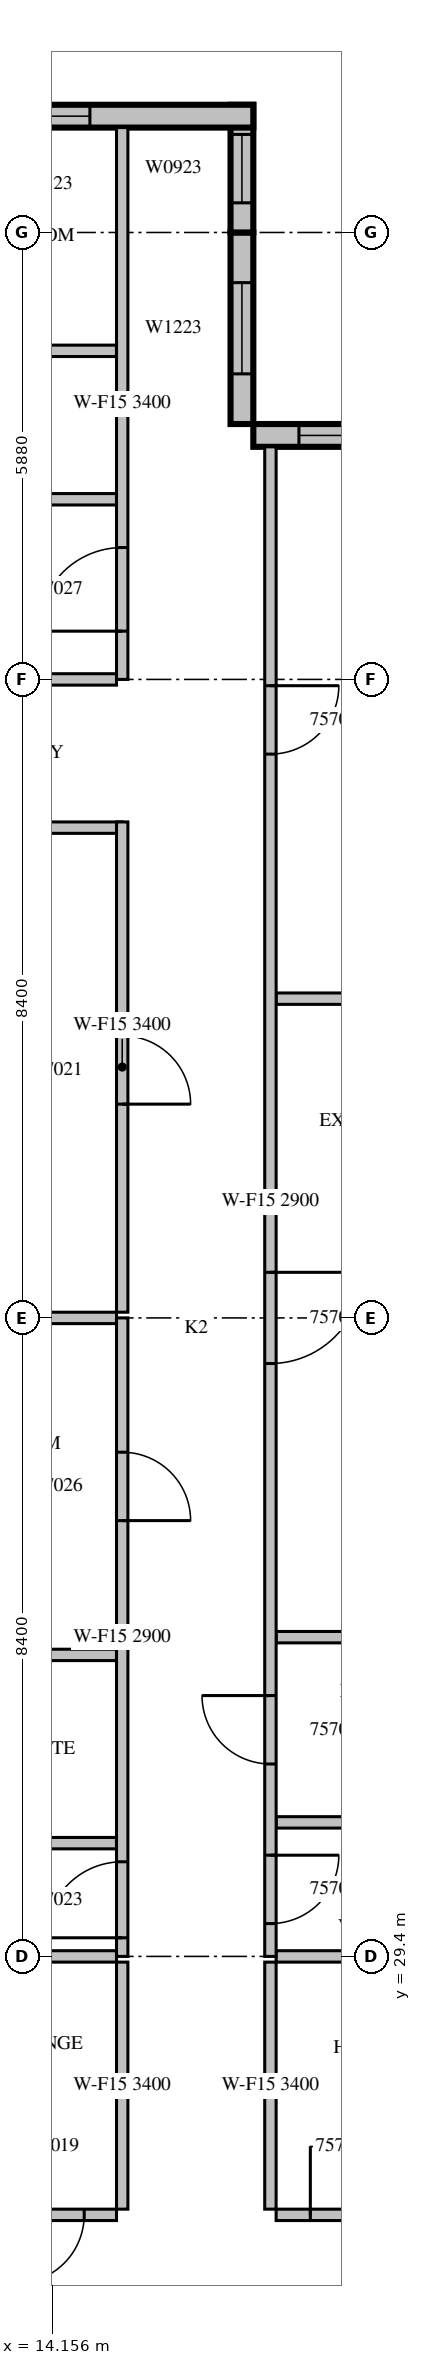
"""IFC4 building model, lengths in metres.
Left out: names, types, materials, properties, quantities, classifications, styles, units other than length and angle.
Written with IfcOpenShell. Run it as: python <this file> out.ifc"""

import sys

from ifc_helpers import new_model, si_unit, direction, frame, frame_2d, origin, place, context, subcontext, project, spatial, rectangle, extrude, source, transform, mapped, element, fill, save


model = new_model("IFC4")
c1 = context("Model", 3, precision=1e-05, world=origin(), true_north=direction((0.0, 1.0)))
c2 = subcontext(c1, "Body", "Model", "MODEL_VIEW")
j1 = project(units=[si_unit("LENGTHUNIT", "METRE"), si_unit("PLANEANGLEUNIT", "RADIAN")], contexts=[c1])
p1 = place(None, origin())
s1 = spatial("IfcSite", under=j1, at=p1, CompositionType="ELEMENT")
p2 = place(p1, origin())
s2 = spatial("IfcBuilding", under=s1, at=p2, CompositionType="ELEMENT")
p3 = place(p2, frame((0.0, 0.0, 250.0)))
s3 = spatial("IfcBuildingStorey", under=s2, at=p3, CompositionType="ELEMENT", Elevation=250.0)
m1 = source(origin(), c2, "Body", "SweptSolid", [
    extrude(rectangle(XDim=4.2, YDim=0.3, at=frame_2d((2.1, 0.0))), origin(), (0.0, 0.0, 1.0), 3.4),
])
p4 = place(p3, frame((21.0, 49.41, 0.0), z_axis=(0.0, 0.0, 1.0), x_axis=(-1.0, 0.0, 0.0)))
e1 = element("IfcWall", 1, at=p4, inside=s3, PredefinedType="STANDARD", context=c2, shape_type="MappedRepresentation", body=[
    mapped(m1, transform((0.0, 0.0, 0.0), scale=1.0)),
])
m2 = source(origin(), c2, "Body", "SweptSolid", [
    extrude(rectangle(XDim=3.0, YDim=2.3, at=frame_2d((1.5, 1.15))), frame((0.0, 0.16, 0.0), z_axis=(0.0, -1.0, 0.0), x_axis=(1.0, 0.0, 0.0)), (0.0, 0.0, 1.0), 0.32),
])
p5 = place(p4, frame((0.6, 0.0, 0.6)))
e2 = element("IfcOpeningElement", 2, at=p5, cuts=e1, PredefinedType="OPENING", context=c2, shape_type="MappedRepresentation", body=[
    mapped(m2, transform((0.0, 0.0, 0.0), scale=1.0)),
])
m3 = source(origin(), c2, "Body", "SweptSolid", [
    extrude(rectangle(XDim=2.52, YDim=0.3, at=frame_2d((1.26, 0.0))), origin(), (0.0, 0.0, 1.0), 3.4),
])
p6 = place(p3, frame((16.65, 49.56, 0.0), z_axis=(0.0, 0.0, 1.0), x_axis=(0.0, 1.0, 0.0)))
e3 = element("IfcWall", 3, at=p6, inside=s3, PredefinedType="STANDARD", context=c2, shape_type="MappedRepresentation", body=[
    mapped(m3, transform((0.0, 0.0, 0.0), scale=1.0)),
])
m4 = source(origin(), c2, "Body", "SweptSolid", [
    extrude(rectangle(XDim=1.2, YDim=2.3, at=frame_2d((0.6, 1.15))), frame((0.0, 0.16, 0.0), z_axis=(0.0, -1.0, 0.0), x_axis=(1.0, 0.0, 0.0)), (0.0, 0.0, 1.0), 0.32),
])
p7 = place(p6, frame((0.66, 0.0, 0.6)))
e4 = element("IfcOpeningElement", 4, at=p7, cuts=e3, PredefinedType="OPENING", context=c2, shape_type="MappedRepresentation", body=[
    mapped(m4, transform((0.0, 0.0, 0.0), scale=1.0)),
])
m5 = source(origin(), c2, "Body", "SweptSolid", [
    extrude(rectangle(XDim=1.68, YDim=0.3, at=frame_2d((0.84, 0.0))), origin(), (0.0, 0.0, 1.0), 3.4),
])
p8 = place(p3, frame((16.65, 52.08, 0.0), z_axis=(0.0, 0.0, 1.0), x_axis=(0.0, 1.0, 0.0)))
e5 = element("IfcWall", 5, at=p8, inside=s3, PredefinedType="STANDARD", context=c2, shape_type="MappedRepresentation", body=[
    mapped(m5, transform((0.0, 0.0, 0.0), scale=1.0)),
])
m6 = source(origin(), c2, "Body", "SweptSolid", [
    extrude(rectangle(XDim=0.9, YDim=2.3, at=frame_2d((0.45, 1.15))), frame((0.0, 0.16, 0.0), z_axis=(0.0, -1.0, 0.0), x_axis=(1.0, 0.0, 0.0)), (0.0, 0.0, 1.0), 0.32),
])
p9 = place(p8, frame((0.39, 0.0, 0.6)))
e6 = element("IfcOpeningElement", 6, at=p9, cuts=e5, PredefinedType="OPENING", context=c2, shape_type="MappedRepresentation", body=[
    mapped(m6, transform((0.0, 0.0, 0.0), scale=1.0)),
])
m7 = source(origin(), c2, "Body", "SweptSolid", [
    extrude(rectangle(XDim=10.5, YDim=0.3, at=frame_2d((5.25, 0.0))), origin(), (0.0, 0.0, 1.0), 3.4),
])
p10 = place(p3, frame((16.8, 53.61, 0.0), z_axis=(0.0, 0.0, 1.0), x_axis=(-1.0, 0.0, 0.0)))
e7 = element("IfcWall", 7, at=p10, inside=s3, PredefinedType="STANDARD", context=c2, shape_type="MappedRepresentation", body=[
    mapped(m7, transform((0.0, 0.0, 0.0), scale=1.0)),
])
p11 = place(p10, frame((2.15, 0.0, 0.6)))
e8 = element("IfcOpeningElement", 8, at=p11, cuts=e7, PredefinedType="OPENING", context=c2, shape_type="MappedRepresentation", body=[
    mapped(m4, transform((0.0, 0.0, 0.0), scale=1.0)),
])
m8 = source(origin(), c2, "Body", "SweptSolid", [
    extrude(rectangle(XDim=1.8, YDim=2.3, at=frame_2d((0.9, 1.15))), frame((0.0, 0.16, 0.0), z_axis=(0.0, -1.0, 0.0), x_axis=(1.0, 0.0, 0.0)), (0.0, 0.0, 1.0), 0.32),
])
p12 = place(p10, frame((8.025, 0.0, 0.6)))
e9 = element("IfcOpeningElement", 9, at=p12, cuts=e7, PredefinedType="OPENING", context=c2, shape_type="MappedRepresentation", body=[
    mapped(m8, transform((0.0, 0.0, 0.0), scale=1.0)),
])
m9 = source(origin(), c2, "Body", "SweptSolid", [
    extrude(rectangle(XDim=8.495, YDim=0.15, at=frame_2d((4.247, 0.0))), origin(), (0.0, 0.0, 1.0), 3.4),
])
p13 = place(p3, frame((6.505, 26.0, 0.0), z_axis=(0.0, 0.0, 1.0), x_axis=(1.0, 0.0, 0.0)))
e10 = element("IfcWall", 10, at=p13, inside=s3, PredefinedType="PARTITIONING", context=c2, shape_type="MappedRepresentation", body=[
    mapped(m9, transform((0.0, 0.0, 0.0), scale=1.0)),
])
m10 = source(origin(), c2, "Body", "SweptSolid", [
    extrude(rectangle(XDim=0.9, YDim=2.1, at=frame_2d((0.45, 1.05))), frame((0.0, 0.085, 0.0), z_axis=(0.0, -1.0, 0.0), x_axis=(1.0, 0.0, 0.0)), (0.0, 0.0, 1.0), 0.17),
])
p14 = place(p13, frame((2.095, 0.0, 0.0)))
e11 = element("IfcOpeningElement", 11, at=p14, cuts=e10, PredefinedType="OPENING", context=c2, shape_type="MappedRepresentation", body=[
    mapped(m10, transform((0.0, 0.0, 0.0), scale=1.0)),
])
p15 = place(p13, frame((7.17, 0.0, 0.0)))
e12 = element("IfcOpeningElement", 12, at=p15, cuts=e10, PredefinedType="OPENING", context=c2, shape_type="MappedRepresentation", body=[
    mapped(m10, transform((0.0, 0.0, 0.0), scale=1.0)),
])
m11 = source(origin(), c2, "Body", "SweptSolid", [
    extrude(rectangle(XDim=3.6, YDim=0.15, at=frame_2d((1.8, 0.0))), origin(), (0.0, 0.0, 1.0), 3.4),
])
p16 = place(p3, frame((17.1, 26.0, 0.0), z_axis=(0.0, 0.0, 1.0), x_axis=(1.0, 0.0, 0.0)))
e13 = element("IfcWall", 13, at=p16, inside=s3, PredefinedType="PARTITIONING", context=c2, shape_type="MappedRepresentation", body=[
    mapped(m11, transform((0.0, 0.0, 0.0), scale=1.0)),
])
p17 = place(p16, frame((0.45, 0.0, 0.0)))
e14 = element("IfcOpeningElement", 14, at=p17, cuts=e13, PredefinedType="OPENING", context=c2, shape_type="MappedRepresentation", body=[
    mapped(m10, transform((0.0, 0.0, 0.0), scale=1.0)),
])
m12 = source(origin(), c2, "Body", "SweptSolid", [
    extrude(rectangle(XDim=3.25, YDim=0.15, at=frame_2d((1.625, 0.0))), origin(), (0.0, 0.0, 1.0), 3.4),
])
for number, where, z_axis, x_axis in (
    (15, (15.075, 26.075, 0.0), (0.0, 0.0, 1.0), (0.0, 1.0, 0.0)),
    (16, (17.025, 29.325, 0.0), (0.0, 0.0, 1.0), (0.0, -1.0, 0.0)),
):
    element("IfcWall", number, at=place(p3, frame(where, z_axis=z_axis, x_axis=x_axis)), inside=s3, PredefinedType="PARTITIONING", context=c2, shape_type="MappedRepresentation", body=[
        mapped(m12, transform((0.0, 0.0, 0.0), scale=1.0)),
    ])
m13 = source(origin(), c2, "Body", "SweptSolid", [
    extrude(rectangle(XDim=4.101, YDim=0.15, at=frame_2d((2.05, 0.0))), origin(), (0.0, 0.0, 1.0), 3.4),
])
p18 = place(p3, frame((15.0, 29.4, 0.0), z_axis=(0.0, 0.0, 1.0), x_axis=(-1.0, 0.0, 0.0)))
e17 = element("IfcWall", 17, at=p18, inside=s3, PredefinedType="PARTITIONING", context=c2, shape_type="MappedRepresentation", body=[
    mapped(m13, transform((0.0, 0.0, 0.0), scale=1.0)),
])
m14 = source(origin(), c2, "Body", "SweptSolid", [
    extrude(rectangle(XDim=3.101, YDim=0.15, at=frame_2d((1.55, 0.0))), origin(), (0.0, 0.0, 1.0), 3.4),
])
p19 = place(p3, frame((20.201, 29.4, 0.0), z_axis=(0.0, 0.0, 1.0), x_axis=(-1.0, 0.0, 0.0)))
e18 = element("IfcWall", 18, at=p19, inside=s3, PredefinedType="PARTITIONING", context=c2, shape_type="MappedRepresentation", body=[
    mapped(m14, transform((0.0, 0.0, 0.0), scale=1.0)),
])
m15 = source(origin(), c2, "Body", "SweptSolid", [
    extrude(rectangle(XDim=3.175, YDim=0.15, at=frame_2d((1.587, 0.0))), origin(), (0.0, 0.0, 1.0), 3.4),
])
p20 = place(p3, frame((15.075, 44.25, 0.0), z_axis=(0.0, 0.0, 1.0), x_axis=(-1.0, 0.0, 0.0)))
e19 = element("IfcWall", 19, at=p20, inside=s3, PredefinedType="PARTITIONING", context=c2, shape_type="MappedRepresentation", body=[
    mapped(m15, transform((0.0, 0.0, 0.0), scale=1.0)),
])
m16 = source(origin(), c2, "Body", "SweptSolid", [
    extrude(rectangle(XDim=6.45, YDim=0.15, at=frame_2d((3.225, 0.0))), origin(), (0.0, 0.0, 1.0), 3.4),
])
p21 = place(p3, frame((15.075, 37.875, 0.0), z_axis=(0.0, 0.0, 1.0), x_axis=(0.0, 1.0, 0.0)))
e20 = element("IfcWall", 20, at=p21, inside=s3, PredefinedType="PARTITIONING", context=c2, shape_type="MappedRepresentation", body=[
    mapped(m16, transform((0.0, 0.0, 0.0), scale=1.0)),
])
p22 = place(p21, frame((2.737, 0.0, 0.0)))
e21 = element("IfcOpeningElement", 21, at=p22, cuts=e20, PredefinedType="OPENING", context=c2, shape_type="MappedRepresentation", body=[
    mapped(m10, transform((0.0, 0.0, 0.0), scale=1.0)),
])
m17 = source(origin(), c2, "Body", "SweptSolid", [
    extrude(rectangle(XDim=3.95, YDim=0.15, at=frame_2d((1.975, 0.0))), origin(), (0.0, 0.0, 1.0), 3.4),
])
for number, where, z_axis, x_axis in (
    (22, (15.0, 30.89, 0.0), (0.0, 0.0, 1.0), (-1.0, 0.0, 0.0)),
    (23, (15.0, 33.367, 0.0), (0.0, 0.0, 1.0), (-1.0, 0.0, 0.0)),
    (24, (15.0, 37.8, 0.0), (0.0, 0.0, 1.0), (-1.0, 0.0, 0.0)),
    (25, (15.0, 48.57, 0.0), (0.0, 0.0, 1.0), (-1.0, 0.0, 0.0)),
    (26, (15.0, 50.523, 0.0), (0.0, 0.0, 1.0), (-1.0, 0.0, 0.0)),
    (27, (15.0, 46.2, 0.0), (0.0, 0.0, 1.0), (-1.0, 0.0, 0.0)),
):
    element("IfcWall", number, at=place(p3, frame(where, z_axis=z_axis, x_axis=x_axis)), inside=s3, PredefinedType="PARTITIONING", context=c2, shape_type="MappedRepresentation", body=[
        mapped(m17, transform((0.0, 0.0, 0.0), scale=1.0)),
    ])
m18 = source(origin(), c2, "Body", "SweptSolid", [
    extrude(rectangle(XDim=3.6, YDim=0.15, at=frame_2d((1.8, 0.0))), origin(), (0.0, 0.0, 1.0), 2.4),
])
for number, where, z_axis, x_axis in (
    (28, (17.1, 31.163, 0.0), (0.0, 0.0, 1.0), (1.0, 0.0, 0.0)),
    (29, (20.7, 33.6, 0.0), (0.0, 0.0, 1.0), (-1.0, 0.0, 0.0)),
):
    element("IfcWall", number, at=place(p3, frame(where, z_axis=z_axis, x_axis=x_axis)), inside=s3, PredefinedType="PARTITIONING", context=c2, shape_type="MappedRepresentation", body=[
        mapped(m18, transform((0.0, 0.0, 0.0), scale=1.0)),
    ])
p23 = place(p3, frame((20.7, 42.0, 0.0), z_axis=(0.0, 0.0, 1.0), x_axis=(-1.0, 0.0, 0.0)))
e30 = element("IfcWall", 30, at=p23, inside=s3, PredefinedType="PARTITIONING", context=c2, shape_type="MappedRepresentation", body=[
    mapped(m11, transform((0.0, 0.0, 0.0), scale=1.0)),
])
m19 = source(origin(), c2, "Body", "SweptSolid", [
    extrude(rectangle(XDim=8.4, YDim=0.15, at=frame_2d((4.2, 0.0))), origin(), (0.0, 0.0, 1.0), 2.9),
])
p24 = place(p3, frame((15.075, 29.4, 0.0), z_axis=(0.0, 0.0, 1.0), x_axis=(0.0, 1.0, 0.0)))
e31 = element("IfcWall", 31, at=p24, inside=s3, PredefinedType="PARTITIONING", context=c2, shape_type="MappedRepresentation", body=[
    mapped(m19, transform((0.0, 0.0, 0.0), scale=1.0)),
])
m20 = source(origin(), c2, "Body", "SweptSolid", [
    extrude(rectangle(XDim=1.0, YDim=2.1, at=frame_2d((0.5, 1.05))), frame((0.0, 0.085, 0.0), z_axis=(0.0, -1.0, 0.0), x_axis=(1.0, 0.0, 0.0)), (0.0, 0.0, 1.0), 0.17),
])
p25 = place(p24, frame((0.245, 0.0, 0.0)))
e32 = element("IfcOpeningElement", 32, at=p25, cuts=e31, PredefinedType="OPENING", context=c2, shape_type="MappedRepresentation", body=[
    mapped(m20, transform((0.0, 0.0, 0.0), scale=1.0)),
])
p26 = place(p24, frame((5.733, 0.0, 0.0)))
e33 = element("IfcOpeningElement", 33, at=p26, cuts=e31, PredefinedType="OPENING", context=c2, shape_type="MappedRepresentation", body=[
    mapped(m10, transform((0.0, 0.0, 0.0), scale=1.0)),
])
m21 = source(origin(), c2, "Body", "SweptSolid", [
    extrude(rectangle(XDim=7.26, YDim=0.15, at=frame_2d((3.63, 0.0))), origin(), (0.0, 0.0, 1.0), 3.4),
])
p27 = place(p3, frame((15.075, 46.2, 0.0), z_axis=(0.0, 0.0, 1.0), x_axis=(0.0, 1.0, 0.0)))
e34 = element("IfcWall", 34, at=p27, inside=s3, PredefinedType="PARTITIONING", context=c2, shape_type="MappedRepresentation", body=[
    mapped(m21, transform((0.0, 0.0, 0.0), scale=1.0)),
])
m22 = source(origin(), c2, "Body", "SweptSolid", [
    extrude(rectangle(XDim=1.1, YDim=2.1, at=frame_2d((0.55, 1.05))), frame((0.0, 0.085, 0.0), z_axis=(0.0, -1.0, 0.0), x_axis=(1.0, 0.0, 0.0)), (0.0, 0.0, 1.0), 0.17),
])
p28 = place(p27, frame((0.635, 0.0, 0.0)))
e35 = element("IfcOpeningElement", 35, at=p28, cuts=e34, PredefinedType="OPENING", context=c2, shape_type="MappedRepresentation", body=[
    mapped(m22, transform((0.0, 0.0, 0.0), scale=1.0)),
])
m23 = source(origin(), c2, "Body", "SweptSolid", [
    extrude(rectangle(XDim=19.86, YDim=0.15, at=frame_2d((9.93, 0.0))), origin(), (0.0, 0.0, 1.0), 2.9),
])
p29 = place(p3, frame((17.025, 49.26, 0.0), z_axis=(0.0, 0.0, 1.0), x_axis=(0.0, -1.0, 0.0)))
e36 = element("IfcWall", 36, at=p29, inside=s3, PredefinedType="PARTITIONING", context=c2, shape_type="MappedRepresentation", body=[
    mapped(m23, transform((0.0, 0.0, 0.0), scale=1.0)),
])
p30 = place(p29, frame((18.528, 0.0, 0.0)))
e37 = element("IfcOpeningElement", 37, at=p30, cuts=e36, PredefinedType="OPENING", context=c2, shape_type="MappedRepresentation", body=[
    mapped(m10, transform((0.0, 0.0, 0.0), scale=1.0)),
])
p31 = place(p29, frame((16.428, 0.0, 0.0)))
e38 = element("IfcOpeningElement", 38, at=p31, cuts=e36, PredefinedType="OPENING", context=c2, shape_type="MappedRepresentation", body=[
    mapped(m10, transform((0.0, 0.0, 0.0), scale=1.0)),
])
m24 = source(origin(), c2, "Body", "SweptSolid", [
    extrude(rectangle(XDim=1.2, YDim=2.1, at=frame_2d((0.6, 1.05))), frame((0.0, 0.085, 0.0), z_axis=(0.0, -1.0, 0.0), x_axis=(1.0, 0.0, 0.0)), (0.0, 0.0, 1.0), 0.17),
])
p32 = place(p29, frame((10.86, 0.0, 0.0)))
e39 = element("IfcOpeningElement", 39, at=p32, cuts=e36, PredefinedType="OPENING", context=c2, shape_type="MappedRepresentation", body=[
    mapped(m24, transform((0.0, 0.0, 0.0), scale=1.0)),
])
p33 = place(p29, frame((3.143, 0.0, 0.0)))
e40 = element("IfcOpeningElement", 40, at=p33, cuts=e36, PredefinedType="OPENING", context=c2, shape_type="MappedRepresentation", body=[
    mapped(m10, transform((0.0, 0.0, 0.0), scale=1.0)),
])
m25 = source(origin(), c2, "Body", "SweptSolid", [
    extrude(rectangle(XDim=3.0, YDim=2.3, at=frame_2d((1.5, 1.15))), frame((0.0, 0.03, 0.0), z_axis=(0.0, -1.0, 0.0), x_axis=(1.0, 0.0, 0.0)), (0.0, 0.0, 1.0), 0.06),
])
p34 = place(p5, origin())
e41 = element("IfcWindow", 41, at=p34, inside=s3, PartitioningType="SINGLE_PANEL", PredefinedType="WINDOW", context=c2, shape_type="MappedRepresentation", body=[
    mapped(m25, transform((0.0, 0.0, 0.0), scale=1.0)),
])
fill(e2, e41)
m26 = source(origin(), c2, "Body", "SweptSolid", [
    extrude(rectangle(XDim=1.2, YDim=2.3, at=frame_2d((0.6, 1.15))), frame((0.0, 0.03, 0.0), z_axis=(0.0, -1.0, 0.0), x_axis=(1.0, 0.0, 0.0)), (0.0, 0.0, 1.0), 0.06),
])
p35 = place(p7, origin())
e42 = element("IfcWindow", 42, at=p35, inside=s3, PartitioningType="SINGLE_PANEL", PredefinedType="WINDOW", context=c2, shape_type="MappedRepresentation", body=[
    mapped(m26, transform((0.0, 0.0, 0.0), scale=1.0)),
])
fill(e4, e42)
m27 = source(origin(), c2, "Body", "SweptSolid", [
    extrude(rectangle(XDim=0.9, YDim=2.3, at=frame_2d((0.45, 1.15))), frame((0.0, 0.03, 0.0), z_axis=(0.0, -1.0, 0.0), x_axis=(1.0, 0.0, 0.0)), (0.0, 0.0, 1.0), 0.06),
])
p36 = place(p9, origin())
e43 = element("IfcWindow", 43, at=p36, inside=s3, PartitioningType="SINGLE_PANEL", PredefinedType="WINDOW", context=c2, shape_type="MappedRepresentation", body=[
    mapped(m27, transform((0.0, 0.0, 0.0), scale=1.0)),
])
fill(e6, e43)
p37 = place(p11, origin())
e44 = element("IfcWindow", 44, at=p37, inside=s3, PartitioningType="SINGLE_PANEL", PredefinedType="WINDOW", context=c2, shape_type="MappedRepresentation", body=[
    mapped(m26, transform((0.0, 0.0, 0.0), scale=1.0)),
])
fill(e8, e44)
m28 = source(origin(), c2, "Body", "SweptSolid", [
    extrude(rectangle(XDim=0.9, YDim=2.1, at=frame_2d((0.45, 1.05))), frame((0.0, 0.025, 0.0), z_axis=(0.0, -1.0, 0.0), x_axis=(1.0, 0.0, 0.0)), (0.0, 0.0, 1.0), 0.05),
])
p38 = place(p15, origin())
e45 = element("IfcDoor", 45, at=p38, inside=s3, OperationType="SINGLE_SWING_RIGHT", PredefinedType="DOOR", context=c2, shape_type="MappedRepresentation", body=[
    mapped(m28, transform((0.0, 0.0, 0.0), scale=1.0)),
])
fill(e12, e45)
p39 = place(p17, origin())
e46 = element("IfcDoor", 46, at=p39, inside=s3, OperationType="SINGLE_SWING_LEFT", PredefinedType="DOOR", context=c2, shape_type="MappedRepresentation", body=[
    mapped(m28, transform((0.0, 0.0, 0.0), scale=1.0)),
])
fill(e14, e46)
p40 = place(p22, origin())
e47 = element("IfcDoor", 47, at=p40, inside=s3, OperationType="SINGLE_SWING_RIGHT", PredefinedType="DOOR", context=c2, shape_type="MappedRepresentation", body=[
    mapped(m28, transform((0.0, 0.0, 0.0), scale=1.0)),
])
fill(e21, e47)
m29 = source(origin(), c2, "Body", "SweptSolid", [
    extrude(rectangle(XDim=1.0, YDim=2.1, at=frame_2d((0.5, 1.05))), frame((0.0, 0.025, 0.0), z_axis=(0.0, -1.0, 0.0), x_axis=(1.0, 0.0, 0.0)), (0.0, 0.0, 1.0), 0.05),
])
p41 = place(p25, origin())
e48 = element("IfcDoor", 48, at=p41, inside=s3, OperationType="SINGLE_SWING_LEFT", PredefinedType="DOOR", context=c2, shape_type="MappedRepresentation", body=[
    mapped(m29, transform((0.0, 0.0, 0.0), scale=1.0)),
])
fill(e32, e48)
p42 = place(p26, origin())
e49 = element("IfcDoor", 49, at=p42, inside=s3, OperationType="SINGLE_SWING_RIGHT", PredefinedType="DOOR", context=c2, shape_type="MappedRepresentation", body=[
    mapped(m28, transform((0.0, 0.0, 0.0), scale=1.0)),
])
fill(e33, e49)
m30 = source(origin(), c2, "Body", "SweptSolid", [
    extrude(rectangle(XDim=1.1, YDim=2.1, at=frame_2d((0.55, 1.05))), frame((0.0, 0.025, 0.0), z_axis=(0.0, -1.0, 0.0), x_axis=(1.0, 0.0, 0.0)), (0.0, 0.0, 1.0), 0.05),
])
p43 = place(p28, origin())
e50 = element("IfcDoor", 50, at=p43, inside=s3, OperationType="SINGLE_SWING_LEFT", PredefinedType="DOOR", context=c2, shape_type="MappedRepresentation", body=[
    mapped(m30, transform((0.0, 0.0, 0.0), scale=1.0)),
])
fill(e35, e50)
p44 = place(p30, origin())
e51 = element("IfcDoor", 51, at=p44, inside=s3, OperationType="SINGLE_SWING_LEFT", PredefinedType="DOOR", context=c2, shape_type="MappedRepresentation", body=[
    mapped(m28, transform((0.0, 0.0, 0.0), scale=1.0)),
])
fill(e37, e51)
p45 = place(p31, origin())
e52 = element("IfcDoor", 52, at=p45, inside=s3, OperationType="SINGLE_SWING_RIGHT", PredefinedType="DOOR", context=c2, shape_type="MappedRepresentation", body=[
    mapped(m28, transform((0.0, 0.0, 0.0), scale=1.0)),
])
fill(e38, e52)
m31 = source(origin(), c2, "Body", "SweptSolid", [
    extrude(rectangle(XDim=1.2, YDim=2.1, at=frame_2d((0.6, 1.05))), frame((0.0, 0.025, 0.0), z_axis=(0.0, -1.0, 0.0), x_axis=(1.0, 0.0, 0.0)), (0.0, 0.0, 1.0), 0.05),
])
p46 = place(p32, origin())
e53 = element("IfcDoor", 53, at=p46, inside=s3, OperationType="SINGLE_SWING_LEFT", PredefinedType="DOOR", context=c2, shape_type="MappedRepresentation", body=[
    mapped(m31, transform((0.0, 0.0, 0.0), scale=1.0)),
])
fill(e39, e53)
p47 = place(p33, origin())
e54 = element("IfcDoor", 54, at=p47, inside=s3, OperationType="SINGLE_SWING_LEFT", PredefinedType="DOOR", context=c2, shape_type="MappedRepresentation", body=[
    mapped(m28, transform((0.0, 0.0, 0.0), scale=1.0)),
])
fill(e40, e54)
save(model, sys.argv[1])
